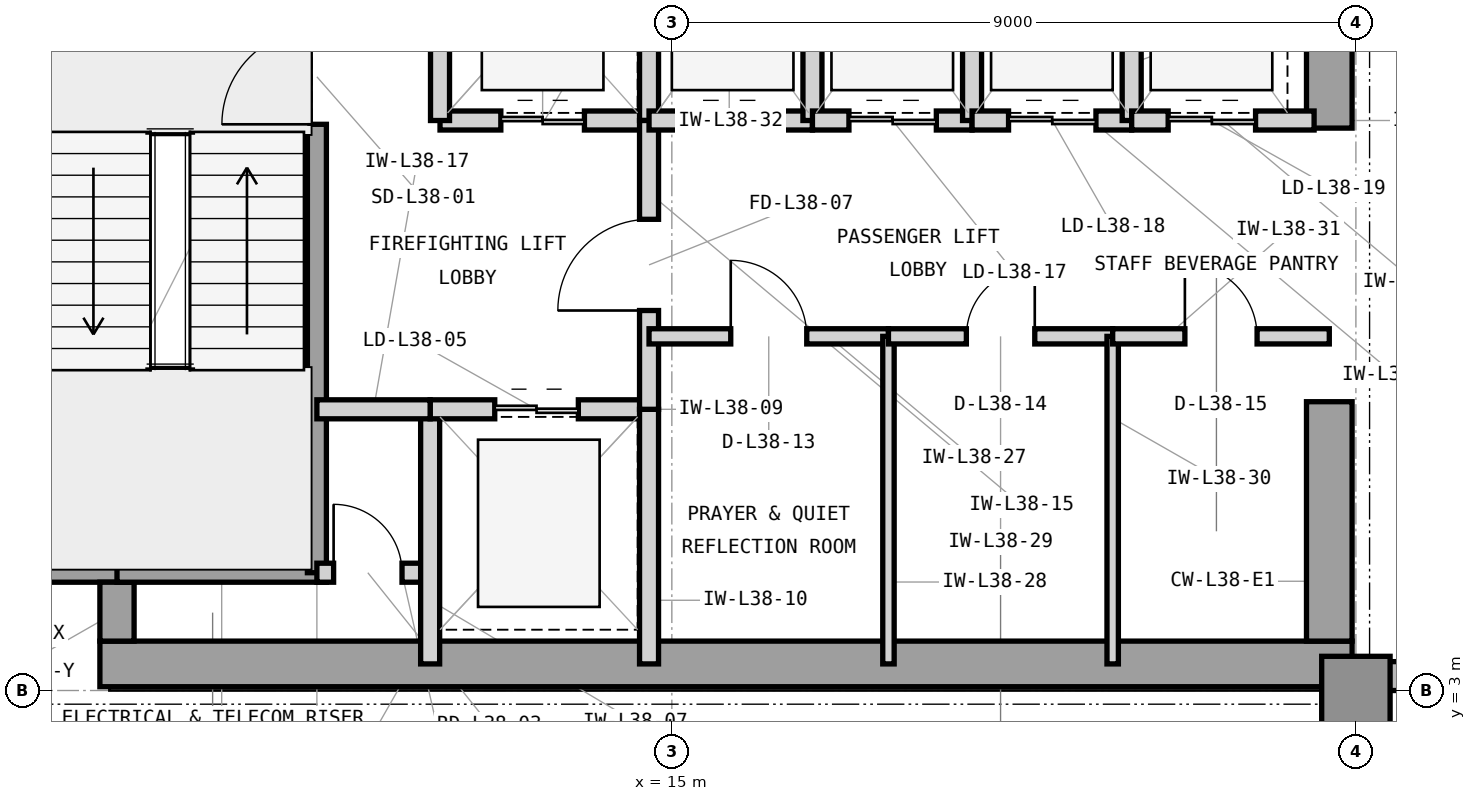
"""IFC4 building model, lengths in metres.
Left out: names, types, materials, properties, quantities, classifications, styles, units other than length and angle.
Written with IfcOpenShell. Run it as: python <this file> out.ifc"""

import sys

from ifc_helpers import new_model, si_unit, direction, frame, frame_2d, origin, origin_2d, place, context, subcontext, project, spatial, rectangle, extrude, element, fill, save


model = new_model("IFC4")
c1 = context("Model", 3, precision=1e-05, world=origin(), true_north=direction((0.0, 1.0)))
c2 = subcontext(c1, "Body", "Model", "MODEL_VIEW")
j1 = project(units=[si_unit("LENGTHUNIT", "METRE"), si_unit("PLANEANGLEUNIT", "RADIAN")], contexts=[c1])
p1 = place(None, origin())
s1 = spatial("IfcSite", under=j1, at=p1, CompositionType="ELEMENT")
p2 = place(p1, origin())
s2 = spatial("IfcBuilding", under=s1, at=p2, CompositionType="ELEMENT")
p3 = place(p2, frame((0.0, 0.0, 160.2)))
s3 = spatial("IfcBuildingStorey", under=s2, at=p3, CompositionType="ELEMENT", Elevation=160.2)
p4 = place(p3, frame((7.475, 3.35, 0.0), z_axis=(0.0, 0.0, 1.0), x_axis=(1.0, 0.0, 0.0)))
e1 = element("IfcWall", 1, at=p4, inside=s3, PredefinedType="SHEAR", context=c2, shape_type="SweptSolid", body=[
    extrude(rectangle(XDim=16.475, YDim=0.6, at=frame_2d((8.237, 0.0))), origin(), (0.0, 0.0, 1.0), 4.2),
])
p5 = place(p3, frame((23.65, 3.65, 0.0), z_axis=(0.0, 0.0, 1.0), x_axis=(0.0, 1.0, 0.0)))
e2 = element("IfcWall", 2, at=p5, inside=s3, PredefinedType="SHEAR", context=c2, shape_type="SweptSolid", body=[
    extrude(rectangle(XDim=3.15, YDim=0.6, at=frame_2d((1.575, 0.0))), origin(), (0.0, 0.0, 1.0), 4.2),
])
p6 = place(p3, frame((23.65, 10.4, 0.0), z_axis=(0.0, 0.0, 1.0), x_axis=(0.0, 1.0, 0.0)))
e3 = element("IfcWall", 3, at=p6, inside=s3, PredefinedType="SHEAR", context=c2, shape_type="SweptSolid", body=[
    extrude(rectangle(XDim=3.2, YDim=0.6, at=frame_2d((1.6, 0.0))), origin(), (0.0, 0.0, 1.0), 4.2),
])
p7 = place(p3, frame((6.65, 4.65, 0.0), z_axis=(0.0, 0.0, 1.0), x_axis=(1.0, 0.0, 0.0)))
e4 = element("IfcWall", 4, at=p7, inside=s3, PredefinedType="SHEAR", context=c2, shape_type="SweptSolid", body=[
    extrude(rectangle(XDim=1.275, YDim=0.45, at=frame_2d((0.638, 0.0))), origin(), (0.0, 0.0, 1.0), 4.2),
])
p8 = place(p3, frame((7.7, 3.65, 0.0), z_axis=(0.0, 0.0, 1.0), x_axis=(0.0, 1.0, 0.0)))
e5 = element("IfcWall", 5, at=p8, inside=s3, PredefinedType="SHEAR", context=c2, shape_type="SweptSolid", body=[
    extrude(rectangle(XDim=0.775, YDim=0.45, at=frame_2d((0.388, 0.0))), origin(), (0.0, 0.0, 1.0), 4.2),
])
p9 = place(p3, frame((24.0, 3.0, 0.0), z_axis=(0.0, 0.0, 1.0), x_axis=(1.0, 0.0, 0.0)))
e6 = element("IfcColumn", 6, at=p9, inside=s3, PredefinedType="COLUMN", context=c2, shape_type="SweptSolid", body=[
    extrude(rectangle(XDim=0.9, YDim=0.9, at=origin_2d()), origin(), (0.0, 0.0, 1.0), 4.2),
])
p10 = place(p3, frame((23.9, 3.19, 0.0), z_axis=(0.0, 0.0, 1.0), x_axis=(1.0, 0.0, 0.0)))
e7 = element("IfcWall", 7, at=p10, inside=s3, PredefinedType="STANDARD", context=c2, shape_type="SweptSolid", body=[
    extrude(rectangle(XDim=31.5, YDim=0.38, at=frame_2d((15.75, 0.0))), origin(), (0.0, 0.0, 1.0), 4.0),
])
p11 = place(p10, frame((4.014, 0.0, 0.7)))
e8 = element("IfcOpeningElement", 8, at=p11, cuts=e7, PredefinedType="OPENING", context=c2, shape_type="SweptSolid", body=[
    extrude(rectangle(XDim=3.0, YDim=2.6, at=frame_2d((1.5, 1.3))), frame((0.0, 0.2, 0.0), z_axis=(0.0, -1.0, 0.0), x_axis=(1.0, 0.0, 0.0)), (0.0, 0.0, 1.0), 0.4),
])
p12 = place(p10, frame((10.064, 0.0, 0.7)))
e9 = element("IfcOpeningElement", 9, at=p12, cuts=e7, PredefinedType="OPENING", context=c2, shape_type="SweptSolid", body=[
    extrude(rectangle(XDim=3.0, YDim=2.6, at=frame_2d((1.5, 1.3))), frame((0.0, 0.2, 0.0), z_axis=(0.0, -1.0, 0.0), x_axis=(1.0, 0.0, 0.0)), (0.0, 0.0, 1.0), 0.4),
])
p13 = place(p10, frame((19.054, 0.0, 0.7)))
e10 = element("IfcOpeningElement", 10, at=p13, cuts=e7, PredefinedType="OPENING", context=c2, shape_type="SweptSolid", body=[
    extrude(rectangle(XDim=3.0, YDim=2.6, at=frame_2d((1.5, 1.3))), frame((0.0, 0.2, 0.0), z_axis=(0.0, -1.0, 0.0), x_axis=(1.0, 0.0, 0.0)), (0.0, 0.0, 1.0), 0.4),
])
p14 = place(p3, frame((7.7, 4.55, 0.0), z_axis=(0.0, 0.0, 1.0), x_axis=(1.0, 0.0, 0.0)))
e11 = element("IfcWall", 11, at=p14, inside=s3, PredefinedType="SHEAR", context=c2, shape_type="SweptSolid", body=[
    extrude(rectangle(XDim=2.755, YDim=0.25, at=frame_2d((1.377, 0.0))), origin(), (0.0, 0.0, 1.0), 4.2),
])
p15 = place(p3, frame((10.33, 4.55, 0.0), z_axis=(0.0, 0.0, 1.0), x_axis=(0.0, 1.0, 0.0)))
e12 = element("IfcWall", 12, at=p15, inside=s3, PredefinedType="SHEAR", context=c2, shape_type="SweptSolid", body=[
    extrude(rectangle(XDim=7.45, YDim=0.25, at=frame_2d((3.725, 0.0))), origin(), (0.0, 0.0, 1.0), 4.2),
])
p16 = place(p15, frame((5.9, 0.0, 0.0)))
e13 = element("IfcOpeningElement", 13, at=p16, cuts=e12, PredefinedType="OPENING", context=c2, shape_type="SweptSolid", body=[
    extrude(rectangle(XDim=1.25, YDim=2.2, at=frame_2d((0.625, 1.1))), frame((0.0, 0.135, 0.0), z_axis=(0.0, -1.0, 0.0), x_axis=(1.0, 0.0, 0.0)), (0.0, 0.0, 1.0), 0.27),
])
p17 = place(p3, frame((10.33, 4.55, 0.0), z_axis=(0.0, 0.0, 1.0), x_axis=(1.0, 0.0, 0.0)))
e14 = element("IfcWall", 14, at=p17, inside=s3, PredefinedType="PARTITIONING", context=c2, shape_type="SweptSolid", body=[
    extrude(rectangle(XDim=1.49, YDim=0.25, at=frame_2d((0.745, 0.0))), origin(), (0.0, 0.0, 1.0), 3.93),
])
p18 = place(p17, frame((0.22, 0.0, 0.0)))
e15 = element("IfcOpeningElement", 15, at=p18, cuts=e14, PredefinedType="OPENING", context=c2, shape_type="SweptSolid", body=[
    extrude(rectangle(XDim=0.9, YDim=2.1, at=frame_2d((0.45, 1.05))), frame((0.0, 0.135, 0.0), z_axis=(0.0, -1.0, 0.0), x_axis=(1.0, 0.0, 0.0)), (0.0, 0.0, 1.0), 0.27),
])
p19 = place(p3, frame((11.82, 3.35, 0.0), z_axis=(0.0, 0.0, 1.0), x_axis=(0.0, 1.0, 0.0)))
e16 = element("IfcWall", 16, at=p19, inside=s3, PredefinedType="PARTITIONING", context=c2, shape_type="SweptSolid", body=[
    extrude(rectangle(XDim=3.35, YDim=0.25, at=frame_2d((1.675, 0.0))), origin(), (0.0, 0.0, 1.0), 3.93),
])
p20 = place(p3, frame((11.82, 6.7, 0.0), z_axis=(0.0, 0.0, 1.0), x_axis=(1.0, 0.0, 0.0)))
e17 = element("IfcWall", 17, at=p20, inside=s3, PredefinedType="PARTITIONING", context=c2, shape_type="SweptSolid", body=[
    extrude(rectangle(XDim=2.88, YDim=0.25, at=frame_2d((1.44, 0.0))), origin(), (0.0, 0.0, 1.0), 3.583),
])
p21 = place(p20, frame((0.85, 0.0, 0.0)))
e18 = element("IfcOpeningElement", 18, at=p21, cuts=e17, PredefinedType="OPENING", context=c2, shape_type="SweptSolid", body=[
    extrude(rectangle(XDim=1.1, YDim=2.25, at=frame_2d((0.55, 1.125))), frame((0.0, 0.135, 0.0), z_axis=(0.0, -1.0, 0.0), x_axis=(1.0, 0.0, 0.0)), (0.0, 0.0, 1.0), 0.27),
])
p22 = place(p3, frame((14.7, 3.35, 0.0), z_axis=(0.0, 0.0, 1.0), x_axis=(0.0, 1.0, 0.0)))
e19 = element("IfcWall", 19, at=p22, inside=s3, PredefinedType="PARTITIONING", context=c2, shape_type="SweptSolid", body=[
    extrude(rectangle(XDim=3.35, YDim=0.25, at=frame_2d((1.675, 0.0))), origin(), (0.0, 0.0, 1.0), 3.93),
])
p23 = place(p3, frame((11.95, 10.5, 0.0), z_axis=(0.0, 0.0, 1.0), x_axis=(1.0, 0.0, 0.0)))
e20 = element("IfcWall", 20, at=p23, inside=s3, PredefinedType="PARTITIONING", context=c2, shape_type="SweptSolid", body=[
    extrude(rectangle(XDim=2.75, YDim=0.25, at=frame_2d((1.375, 0.0))), origin(), (0.0, 0.0, 1.0), 3.583),
])
p24 = place(p23, frame((0.8, 0.0, 0.0)))
e21 = element("IfcOpeningElement", 21, at=p24, cuts=e20, PredefinedType="OPENING", context=c2, shape_type="SweptSolid", body=[
    extrude(rectangle(XDim=1.1, YDim=2.25, at=frame_2d((0.55, 1.125))), frame((0.0, 0.135, 0.0), z_axis=(0.0, -1.0, 0.0), x_axis=(1.0, 0.0, 0.0)), (0.0, 0.0, 1.0), 0.27),
])
for number, where, z_axis, x_axis in (
    (22, (11.95, 10.5, 0.0), (0.0, 0.0, 1.0), (0.0, 1.0, 0.0)),
    (23, (14.7, 10.5, 0.0), (0.0, 0.0, 1.0), (0.0, 1.0, 0.0)),
):
    element("IfcWall", number, at=place(p3, frame(where, z_axis=z_axis, x_axis=x_axis)), inside=s3, PredefinedType="PARTITIONING", context=c2, shape_type="SweptSolid", body=[
        extrude(rectangle(XDim=3.0, YDim=0.25, at=frame_2d((1.5, 0.0))), origin(), (0.0, 0.0, 1.0), 3.93),
    ])
p25 = place(p3, frame((14.7, 6.7, 0.0), z_axis=(0.0, 0.0, 1.0), x_axis=(0.0, 1.0, 0.0)))
e24 = element("IfcWall", 24, at=p25, inside=s3, PredefinedType="PARTITIONING", context=c2, shape_type="SweptSolid", body=[
    extrude(rectangle(XDim=3.8, YDim=0.25, at=frame_2d((1.9, 0.0))), origin(), (0.0, 0.0, 1.0), 3.93),
])
p26 = place(p25, frame((1.3, 0.0, 0.0)))
e25 = element("IfcOpeningElement", 25, at=p26, cuts=e24, PredefinedType="OPENING", context=c2, shape_type="SweptSolid", body=[
    extrude(rectangle(XDim=1.2, YDim=2.2, at=frame_2d((0.6, 1.1))), frame((0.0, 0.135, 0.0), z_axis=(0.0, -1.0, 0.0), x_axis=(1.0, 0.0, 0.0)), (0.0, 0.0, 1.0), 0.27),
])
p27 = place(p3, frame((10.33, 6.7, 0.0), z_axis=(0.0, 0.0, 1.0), x_axis=(1.0, 0.0, 0.0)))
e26 = element("IfcWall", 26, at=p27, inside=s3, PredefinedType="PARTITIONING", context=c2, shape_type="SweptSolid", body=[
    extrude(rectangle(XDim=1.49, YDim=0.25, at=frame_2d((0.745, 0.0))), origin(), (0.0, 0.0, 1.0), 3.583),
])
p28 = place(p3, frame((14.7, 7.66, 0.0), z_axis=(0.0, 0.0, 1.0), x_axis=(1.0, 0.0, 0.0)))
e27 = element("IfcWall", 27, at=p28, inside=s3, PredefinedType="PARTITIONING", context=c2, shape_type="SweptSolid", body=[
    extrude(rectangle(XDim=3.15, YDim=0.2, at=frame_2d((1.575, 0.0))), origin(), (0.0, 0.0, 1.0), 3.93),
])
p29 = place(p28, frame((1.075, 0.0, 0.0)))
e28 = element("IfcOpeningElement", 28, at=p29, cuts=e27, PredefinedType="OPENING", context=c2, shape_type="SweptSolid", body=[
    extrude(rectangle(XDim=1.0, YDim=2.15, at=frame_2d((0.5, 1.075))), frame((0.0, 0.11, 0.0), z_axis=(0.0, -1.0, 0.0), x_axis=(1.0, 0.0, 0.0)), (0.0, 0.0, 1.0), 0.22),
])
p30 = place(p3, frame((17.85, 3.35, 0.0), z_axis=(0.0, 0.0, 1.0), x_axis=(0.0, 1.0, 0.0)))
e29 = element("IfcWall", 29, at=p30, inside=s3, PredefinedType="PARTITIONING", context=c2, shape_type="SweptSolid", body=[
    extrude(rectangle(XDim=4.31, YDim=0.15, at=frame_2d((2.155, 0.0))), origin(), (0.0, 0.0, 1.0), 3.93),
])
p31 = place(p3, frame((17.85, 7.66, 0.0), z_axis=(0.0, 0.0, 1.0), x_axis=(1.0, 0.0, 0.0)))
e30 = element("IfcWall", 30, at=p31, inside=s3, PredefinedType="PARTITIONING", context=c2, shape_type="SweptSolid", body=[
    extrude(rectangle(XDim=2.95, YDim=0.2, at=frame_2d((1.475, 0.0))), origin(), (0.0, 0.0, 1.0), 3.93),
])
p32 = place(p31, frame((1.025, 0.0, 0.0)))
e31 = element("IfcOpeningElement", 31, at=p32, cuts=e30, PredefinedType="OPENING", context=c2, shape_type="SweptSolid", body=[
    extrude(rectangle(XDim=0.9, YDim=2.1, at=frame_2d((0.45, 1.05))), frame((0.0, 0.11, 0.0), z_axis=(0.0, -1.0, 0.0), x_axis=(1.0, 0.0, 0.0)), (0.0, 0.0, 1.0), 0.22),
])
p33 = place(p3, frame((20.8, 3.35, 0.0), z_axis=(0.0, 0.0, 1.0), x_axis=(0.0, 1.0, 0.0)))
e32 = element("IfcWall", 32, at=p33, inside=s3, PredefinedType="PARTITIONING", context=c2, shape_type="SweptSolid", body=[
    extrude(rectangle(XDim=4.31, YDim=0.15, at=frame_2d((2.155, 0.0))), origin(), (0.0, 0.0, 1.0), 3.93),
])
p34 = place(p3, frame((20.8, 7.66, 0.0), z_axis=(0.0, 0.0, 1.0), x_axis=(1.0, 0.0, 0.0)))
e33 = element("IfcWall", 33, at=p34, inside=s3, PredefinedType="PARTITIONING", context=c2, shape_type="SweptSolid", body=[
    extrude(rectangle(XDim=2.85, YDim=0.2, at=frame_2d((1.425, 0.0))), origin(), (0.0, 0.0, 1.0), 3.93),
])
p35 = place(p34, frame((0.95, 0.0, 0.0)))
e34 = element("IfcOpeningElement", 34, at=p35, cuts=e33, PredefinedType="OPENING", context=c2, shape_type="SweptSolid", body=[
    extrude(rectangle(XDim=0.95, YDim=2.1, at=frame_2d((0.475, 1.05))), frame((0.0, 0.11, 0.0), z_axis=(0.0, -1.0, 0.0), x_axis=(1.0, 0.0, 0.0)), (0.0, 0.0, 1.0), 0.22),
])
p36 = place(p3, frame((14.7, 10.5, 0.0), z_axis=(0.0, 0.0, 1.0), x_axis=(1.0, 0.0, 0.0)))
e35 = element("IfcWall", 35, at=p36, inside=s3, PredefinedType="PARTITIONING", context=c2, shape_type="SweptSolid", body=[
    extrude(rectangle(XDim=2.15, YDim=0.25, at=frame_2d((1.075, 0.0))), origin(), (0.0, 0.0, 1.0), 3.583),
])
p37 = place(p36, frame((0.48, 0.0, 0.0)))
e36 = element("IfcOpeningElement", 36, at=p37, cuts=e35, PredefinedType="OPENING", context=c2, shape_type="SweptSolid", body=[
    extrude(rectangle(XDim=1.15, YDim=2.25, at=frame_2d((0.575, 1.125))), frame((0.0, 0.135, 0.0), z_axis=(0.0, -1.0, 0.0), x_axis=(1.0, 0.0, 0.0)), (0.0, 0.0, 1.0), 0.27),
])
p38 = place(p3, frame((16.85, 10.5, 0.0), z_axis=(0.0, 0.0, 1.0), x_axis=(0.0, 1.0, 0.0)))
e37 = element("IfcWall", 37, at=p38, inside=s3, PredefinedType="PARTITIONING", context=c2, shape_type="SweptSolid", body=[
    extrude(rectangle(XDim=3.0, YDim=0.25, at=frame_2d((1.5, 0.0))), origin(), (0.0, 0.0, 1.0), 3.93),
])
p39 = place(p3, frame((16.85, 10.5, 0.0), z_axis=(0.0, 0.0, 1.0), x_axis=(1.0, 0.0, 0.0)))
e38 = element("IfcWall", 38, at=p39, inside=s3, PredefinedType="PARTITIONING", context=c2, shape_type="SweptSolid", body=[
    extrude(rectangle(XDim=2.1, YDim=0.25, at=frame_2d((1.05, 0.0))), origin(), (0.0, 0.0, 1.0), 3.583),
])
p40 = place(p39, frame((0.48, 0.0, 0.0)))
e39 = element("IfcOpeningElement", 39, at=p40, cuts=e38, PredefinedType="OPENING", context=c2, shape_type="SweptSolid", body=[
    extrude(rectangle(XDim=1.15, YDim=2.25, at=frame_2d((0.575, 1.125))), frame((0.0, 0.135, 0.0), z_axis=(0.0, -1.0, 0.0), x_axis=(1.0, 0.0, 0.0)), (0.0, 0.0, 1.0), 0.27),
])
p41 = place(p3, frame((18.95, 10.5, 0.0), z_axis=(0.0, 0.0, 1.0), x_axis=(0.0, 1.0, 0.0)))
e40 = element("IfcWall", 40, at=p41, inside=s3, PredefinedType="PARTITIONING", context=c2, shape_type="SweptSolid", body=[
    extrude(rectangle(XDim=3.0, YDim=0.25, at=frame_2d((1.5, 0.0))), origin(), (0.0, 0.0, 1.0), 3.93),
])
p42 = place(p3, frame((18.95, 10.5, 0.0), z_axis=(0.0, 0.0, 1.0), x_axis=(1.0, 0.0, 0.0)))
e41 = element("IfcWall", 41, at=p42, inside=s3, PredefinedType="PARTITIONING", context=c2, shape_type="SweptSolid", body=[
    extrude(rectangle(XDim=2.1, YDim=0.25, at=frame_2d((1.05, 0.0))), origin(), (0.0, 0.0, 1.0), 3.583),
])
p43 = place(p42, frame((0.48, 0.0, 0.0)))
e42 = element("IfcOpeningElement", 42, at=p43, cuts=e41, PredefinedType="OPENING", context=c2, shape_type="SweptSolid", body=[
    extrude(rectangle(XDim=1.15, YDim=2.25, at=frame_2d((0.575, 1.125))), frame((0.0, 0.135, 0.0), z_axis=(0.0, -1.0, 0.0), x_axis=(1.0, 0.0, 0.0)), (0.0, 0.0, 1.0), 0.27),
])
p44 = place(p3, frame((21.05, 10.5, 0.0), z_axis=(0.0, 0.0, 1.0), x_axis=(0.0, 1.0, 0.0)))
e43 = element("IfcWall", 43, at=p44, inside=s3, PredefinedType="PARTITIONING", context=c2, shape_type="SweptSolid", body=[
    extrude(rectangle(XDim=3.0, YDim=0.25, at=frame_2d((1.5, 0.0))), origin(), (0.0, 0.0, 1.0), 3.93),
])
p45 = place(p3, frame((21.05, 10.5, 0.0), z_axis=(0.0, 0.0, 1.0), x_axis=(1.0, 0.0, 0.0)))
e44 = element("IfcWall", 44, at=p45, inside=s3, PredefinedType="PARTITIONING", context=c2, shape_type="SweptSolid", body=[
    extrude(rectangle(XDim=2.4, YDim=0.25, at=frame_2d((1.2, 0.0))), origin(), (0.0, 0.0, 1.0), 3.583),
])
p46 = place(p45, frame((0.48, 0.0, 0.0)))
e45 = element("IfcOpeningElement", 45, at=p46, cuts=e44, PredefinedType="OPENING", context=c2, shape_type="SweptSolid", body=[
    extrude(rectangle(XDim=1.15, YDim=2.25, at=frame_2d((0.575, 1.125))), frame((0.0, 0.135, 0.0), z_axis=(0.0, -1.0, 0.0), x_axis=(1.0, 0.0, 0.0)), (0.0, 0.0, 1.0), 0.27),
])
p47 = place(p16, origin())
e46 = element("IfcDoor", 46, at=p47, inside=s3, OperationType="SINGLE_SWING_LEFT", PredefinedType="DOOR", context=c2, shape_type="SweptSolid", body=[
    extrude(rectangle(XDim=1.25, YDim=2.2, at=frame_2d((0.625, 1.1))), frame((0.0, 0.025, 0.0), z_axis=(0.0, -1.0, 0.0), x_axis=(1.0, 0.0, 0.0)), (0.0, 0.0, 1.0), 0.05),
])
fill(e13, e46)
p48 = place(p18, origin())
e47 = element("IfcDoor", 47, at=p48, inside=s3, OperationType="SINGLE_SWING_LEFT", PredefinedType="TRAPDOOR", context=c2, shape_type="SweptSolid", body=[
    extrude(rectangle(XDim=0.9, YDim=2.1, at=frame_2d((0.45, 1.05))), frame((0.0, 0.025, 0.0), z_axis=(0.0, -1.0, 0.0), x_axis=(1.0, 0.0, 0.0)), (0.0, 0.0, 1.0), 0.05),
])
fill(e15, e47)
p49 = place(p21, origin())
e48 = element("IfcDoor", 48, at=p49, inside=s3, OperationType="DOUBLE_DOOR_SLIDING", PredefinedType="DOOR", context=c2, shape_type="SweptSolid", body=[
    extrude(rectangle(XDim=1.1, YDim=2.25, at=frame_2d((0.55, 1.125))), frame((0.0, 0.025, 0.0), z_axis=(0.0, -1.0, 0.0), x_axis=(1.0, 0.0, 0.0)), (0.0, 0.0, 1.0), 0.05),
])
fill(e18, e48)
p50 = place(p24, origin())
e49 = element("IfcDoor", 49, at=p50, inside=s3, OperationType="DOUBLE_DOOR_SLIDING", PredefinedType="DOOR", context=c2, shape_type="SweptSolid", body=[
    extrude(rectangle(XDim=1.1, YDim=2.25, at=frame_2d((0.55, 1.125))), frame((0.0, 0.025, 0.0), z_axis=(0.0, -1.0, 0.0), x_axis=(1.0, 0.0, 0.0)), (0.0, 0.0, 1.0), 0.05),
])
fill(e21, e49)
p51 = place(p26, origin())
e50 = element("IfcDoor", 50, at=p51, inside=s3, OperationType="SINGLE_SWING_LEFT", PredefinedType="DOOR", context=c2, shape_type="SweptSolid", body=[
    extrude(rectangle(XDim=1.2, YDim=2.2, at=frame_2d((0.6, 1.1))), frame((0.0, 0.025, 0.0), z_axis=(0.0, -1.0, 0.0), x_axis=(1.0, 0.0, 0.0)), (0.0, 0.0, 1.0), 0.05),
])
fill(e25, e50)
p52 = place(p29, origin())
e51 = element("IfcDoor", 51, at=p52, inside=s3, OperationType="SINGLE_SWING_LEFT", PredefinedType="DOOR", context=c2, shape_type="SweptSolid", body=[
    extrude(rectangle(XDim=1.0, YDim=2.15, at=frame_2d((0.5, 1.075))), frame((0.0, 0.025, 0.0), z_axis=(0.0, -1.0, 0.0), x_axis=(1.0, 0.0, 0.0)), (0.0, 0.0, 1.0), 0.05),
])
fill(e28, e51)
p53 = place(p32, origin())
e52 = element("IfcDoor", 52, at=p53, inside=s3, OperationType="SINGLE_SWING_RIGHT", PredefinedType="TRAPDOOR", context=c2, shape_type="SweptSolid", body=[
    extrude(rectangle(XDim=0.9, YDim=2.1, at=frame_2d((0.45, 1.05))), frame((0.0, 0.025, 0.0), z_axis=(0.0, -1.0, 0.0), x_axis=(1.0, 0.0, 0.0)), (0.0, 0.0, 1.0), 0.05),
])
fill(e31, e52)
p54 = place(p35, origin())
e53 = element("IfcDoor", 53, at=p54, inside=s3, OperationType="SINGLE_SWING_LEFT", PredefinedType="DOOR", context=c2, shape_type="SweptSolid", body=[
    extrude(rectangle(XDim=0.95, YDim=2.1, at=frame_2d((0.475, 1.05))), frame((0.0, 0.025, 0.0), z_axis=(0.0, -1.0, 0.0), x_axis=(1.0, 0.0, 0.0)), (0.0, 0.0, 1.0), 0.05),
])
fill(e34, e53)
p55 = place(p37, origin())
e54 = element("IfcDoor", 54, at=p55, inside=s3, OperationType="DOUBLE_DOOR_SLIDING", PredefinedType="DOOR", context=c2, shape_type="SweptSolid", body=[
    extrude(rectangle(XDim=1.15, YDim=2.25, at=frame_2d((0.575, 1.125))), frame((0.0, 0.025, 0.0), z_axis=(0.0, -1.0, 0.0), x_axis=(1.0, 0.0, 0.0)), (0.0, 0.0, 1.0), 0.05),
])
fill(e36, e54)
p56 = place(p40, origin())
e55 = element("IfcDoor", 55, at=p56, inside=s3, OperationType="DOUBLE_DOOR_SLIDING", PredefinedType="DOOR", context=c2, shape_type="SweptSolid", body=[
    extrude(rectangle(XDim=1.15, YDim=2.25, at=frame_2d((0.575, 1.125))), frame((0.0, 0.025, 0.0), z_axis=(0.0, -1.0, 0.0), x_axis=(1.0, 0.0, 0.0)), (0.0, 0.0, 1.0), 0.05),
])
fill(e39, e55)
p57 = place(p43, origin())
e56 = element("IfcDoor", 56, at=p57, inside=s3, OperationType="DOUBLE_DOOR_SLIDING", PredefinedType="DOOR", context=c2, shape_type="SweptSolid", body=[
    extrude(rectangle(XDim=1.15, YDim=2.25, at=frame_2d((0.575, 1.125))), frame((0.0, 0.025, 0.0), z_axis=(0.0, -1.0, 0.0), x_axis=(1.0, 0.0, 0.0)), (0.0, 0.0, 1.0), 0.05),
])
fill(e42, e56)
p58 = place(p46, origin())
e57 = element("IfcDoor", 57, at=p58, inside=s3, OperationType="DOUBLE_DOOR_SLIDING", PredefinedType="DOOR", context=c2, shape_type="SweptSolid", body=[
    extrude(rectangle(XDim=1.15, YDim=2.25, at=frame_2d((0.575, 1.125))), frame((0.0, 0.025, 0.0), z_axis=(0.0, -1.0, 0.0), x_axis=(1.0, 0.0, 0.0)), (0.0, 0.0, 1.0), 0.05),
])
fill(e45, e57)
save(model, sys.argv[1])
